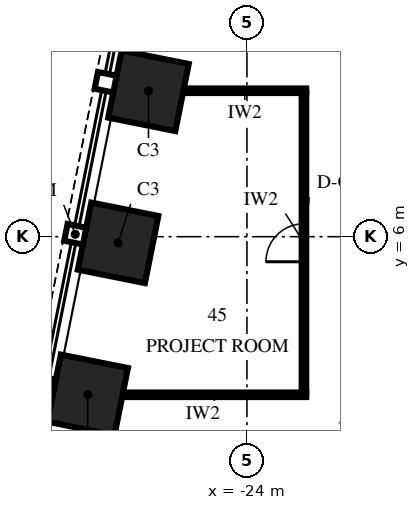
"""IFC4 building model, lengths in metres.
Left out: names, types, materials, properties, quantities, classifications, styles, units other than length and angle.
Written with IfcOpenShell. Run it as: python <this file> out.ifc"""

import sys

from ifc_helpers import new_model, si_unit, direction, frame, frame_2d, origin, origin_2d, place, context, subcontext, project, spatial, rectangle, extrude, element, fill, save


model = new_model("IFC4")
c1 = context("Model", 3, precision=1e-05, world=origin(), true_north=direction((0.0, 1.0)))
c2 = subcontext(c1, "Body", "Model", "MODEL_VIEW")
j1 = project(units=[si_unit("LENGTHUNIT", "METRE"), si_unit("PLANEANGLEUNIT", "RADIAN")], contexts=[c1])
p1 = place(None, origin())
s1 = spatial("IfcSite", under=j1, at=p1, CompositionType="ELEMENT")
p2 = place(p1, origin())
s2 = spatial("IfcBuilding", under=s1, at=p2, CompositionType="ELEMENT")
p3 = place(p2, frame((0.0, 0.0, 139.0)))
s3 = spatial("IfcBuildingStorey", under=s2, at=p3, CompositionType="ELEMENT", Elevation=139.0)
for number, where, z_axis, x_axis in (
    (1, (-26.591, 9.838, 0.0), (0.0, 0.0, 1.0), (-0.196, -0.981, 0.0)),
    (2, (-27.391, 5.838, 0.0), (0.0, 0.0, 1.0), (-0.196, -0.981, 0.0)),
    (3, (-28.191, 1.838, 0.0), (0.0, 0.0, 1.0), (-0.196, -0.981, 0.0)),
):
    element("IfcColumn", number, at=place(p3, frame(where, z_axis=z_axis, x_axis=x_axis)), inside=s3, PredefinedType="COLUMN", context=c2, shape_type="SweptSolid", body=[
        extrude(rectangle(XDim=1.8, YDim=1.8, at=origin_2d()), origin(), (0.0, 0.0, 1.0), 4.0),
    ])
p4 = place(p3, frame((-27.273, 1.84, 0.0), z_axis=(0.0, 0.0, 1.0), x_axis=(1.0, 0.0, 0.0)))
e4 = element("IfcWall", 4, at=p4, inside=s3, PredefinedType="PARTITIONING", context=c2, shape_type="SweptSolid", body=[
    extrude(rectangle(XDim=4.833, YDim=0.12, at=frame_2d((2.417, 0.0))), origin(), (0.0, 0.0, 1.0), 3.25),
])
p5 = place(p3, frame((-25.673, 9.84, 0.0), z_axis=(0.0, 0.0, 1.0), x_axis=(1.0, 0.0, 0.0)))
e5 = element("IfcWall", 5, at=p5, inside=s3, PredefinedType="PARTITIONING", context=c2, shape_type="SweptSolid", body=[
    extrude(rectangle(XDim=3.233, YDim=0.12, at=frame_2d((1.616, 0.0))), origin(), (0.0, 0.0, 1.0), 3.25),
])
p6 = place(p3, frame((-22.5, 1.9, 0.0), z_axis=(0.0, 0.0, 1.0), x_axis=(0.0, 1.0, 0.0)))
e6 = element("IfcWall", 6, at=p6, inside=s3, PredefinedType="PARTITIONING", context=c2, shape_type="SweptSolid", body=[
    extrude(rectangle(XDim=7.88, YDim=0.12, at=frame_2d((3.94, 0.0))), origin(), (0.0, 0.0, 1.0), 2.842),
])
p7 = place(p6, frame((3.44, 0.0, 0.0)))
e7 = element("IfcOpeningElement", 7, at=p7, cuts=e6, PredefinedType="OPENING", context=c2, shape_type="SweptSolid", body=[
    extrude(rectangle(XDim=1.0, YDim=2.4, at=frame_2d((0.5, 1.2))), frame((0.0, 0.075, 0.0), z_axis=(0.0, -1.0, 0.0), x_axis=(1.0, 0.0, 0.0)), (0.0, 0.0, 1.0), 0.15),
])
p8 = place(p7, origin())
e8 = element("IfcDoor", 8, at=p8, inside=s3, OperationType="SINGLE_SWING_RIGHT", PredefinedType="DOOR", context=c2, shape_type="SweptSolid", body=[
    extrude(rectangle(XDim=1.0, YDim=2.4, at=frame_2d((0.5, 1.2))), frame((0.0, 0.06, 0.0), z_axis=(0.0, -1.0, 0.0), x_axis=(1.0, 0.0, 0.0)), (0.0, 0.0, 1.0), 0.12),
])
fill(e7, e8)
save(model, sys.argv[1])
